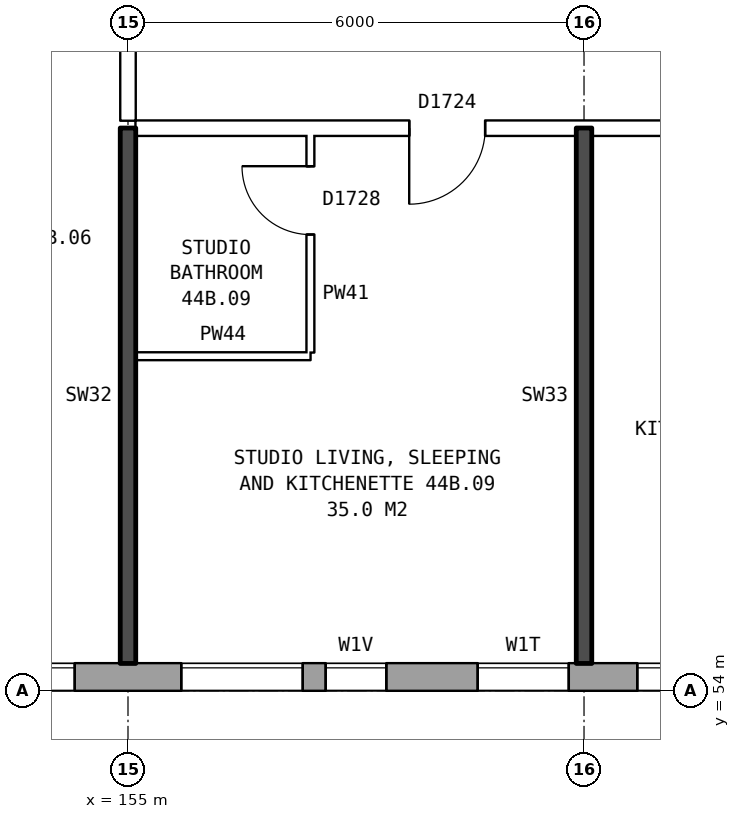
"""IFC4 building model, lengths in metres.
Left out: names, types, materials, properties, quantities, classifications, styles, units other than length and angle.
Written with IfcOpenShell. Run it as: python <this file> out.ifc"""

import sys

from ifc_helpers import new_model, si_unit, direction, frame, frame_2d, origin, place, context, subcontext, project, spatial, rectangle, extrude, element, fill, save


model = new_model("IFC4")
c1 = context("Model", 3, precision=1e-05, world=origin(), true_north=direction((0.0, 1.0)))
c2 = subcontext(c1, "Body", "Model", "MODEL_VIEW")
j1 = project(units=[si_unit("LENGTHUNIT", "METRE"), si_unit("PLANEANGLEUNIT", "RADIAN")], contexts=[c1])
p1 = place(None, origin())
s1 = spatial("IfcSite", under=j1, at=p1, CompositionType="ELEMENT")
p2 = place(p1, origin())
s2 = spatial("IfcBuilding", under=s1, at=p2, CompositionType="ELEMENT")
p3 = place(p2, frame((0.0, 0.0, 157.8)))
s3 = spatial("IfcBuildingStorey", under=s2, at=p3, CompositionType="ELEMENT", Elevation=157.8)
p4 = place(p3, frame((134.075, 54.18, 0.0), z_axis=(0.0, 0.0, 1.0), x_axis=(1.0, 0.0, 0.0)))
e1 = element("IfcWall", 1, at=p4, inside=s3, PredefinedType="STANDARD", context=c2, shape_type="SweptSolid", body=[
    extrude(rectangle(XDim=34.351, YDim=0.36, at=frame_2d((17.175, 0.0))), origin(), (0.0, 0.0, 1.0), 2.85),
])
p5 = place(p4, frame((0.625, 0.0, 0.8)))
e2 = element("IfcOpeningElement", 2, at=p5, cuts=e1, PredefinedType="OPENING", context=c2, shape_type="SweptSolid", body=[
    extrude(rectangle(XDim=1.6, YDim=1.8, at=frame_2d((0.8, 0.9))), frame((0.0, 0.19, 0.0), z_axis=(0.0, -1.0, 0.0), x_axis=(1.0, 0.0, 0.0)), (0.0, 0.0, 1.0), 0.38),
])
p6 = place(p4, frame((3.625, 0.0, 0.8)))
e3 = element("IfcOpeningElement", 3, at=p6, cuts=e1, PredefinedType="OPENING", context=c2, shape_type="SweptSolid", body=[
    extrude(rectangle(XDim=1.6, YDim=1.8, at=frame_2d((0.8, 0.9))), frame((0.0, 0.19, 0.0), z_axis=(0.0, -1.0, 0.0), x_axis=(1.0, 0.0, 0.0)), (0.0, 0.0, 1.0), 0.38),
])
p7 = place(p4, frame((5.525, 0.0, 0.8)))
e4 = element("IfcOpeningElement", 4, at=p7, cuts=e1, PredefinedType="OPENING", context=c2, shape_type="SweptSolid", body=[
    extrude(rectangle(XDim=1.4, YDim=1.8, at=frame_2d((0.7, 0.9))), frame((0.0, 0.19, 0.0), z_axis=(0.0, -1.0, 0.0), x_axis=(1.0, 0.0, 0.0)), (0.0, 0.0, 1.0), 0.38),
])
p8 = place(p4, frame((9.575, 0.0, 0.45)))
e5 = element("IfcOpeningElement", 5, at=p8, cuts=e1, PredefinedType="OPENING", context=c2, shape_type="SweptSolid", body=[
    extrude(rectangle(XDim=0.6, YDim=0.9, at=frame_2d((0.3, 0.45))), frame((0.0, 0.19, 0.0), z_axis=(0.0, -1.0, 0.0), x_axis=(1.0, 0.0, 0.0)), (0.0, 0.0, 1.0), 0.38),
])
p9 = place(p4, frame((12.625, 0.0, 0.8)))
e6 = element("IfcOpeningElement", 6, at=p9, cuts=e1, PredefinedType="OPENING", context=c2, shape_type="SweptSolid", body=[
    extrude(rectangle(XDim=1.6, YDim=1.8, at=frame_2d((0.8, 0.9))), frame((0.0, 0.19, 0.0), z_axis=(0.0, -1.0, 0.0), x_axis=(1.0, 0.0, 0.0)), (0.0, 0.0, 1.0), 0.38),
])
p10 = place(p4, frame((15.625, 0.0, 0.8)))
e7 = element("IfcOpeningElement", 7, at=p10, cuts=e1, PredefinedType="OPENING", context=c2, shape_type="SweptSolid", body=[
    extrude(rectangle(XDim=1.6, YDim=1.8, at=frame_2d((0.8, 0.9))), frame((0.0, 0.19, 0.0), z_axis=(0.0, -1.0, 0.0), x_axis=(1.0, 0.0, 0.0)), (0.0, 0.0, 1.0), 0.38),
])
p11 = place(p4, frame((18.625, 0.0, 0.8)))
e8 = element("IfcOpeningElement", 8, at=p11, cuts=e1, PredefinedType="OPENING", context=c2, shape_type="SweptSolid", body=[
    extrude(rectangle(XDim=1.6, YDim=1.8, at=frame_2d((0.8, 0.9))), frame((0.0, 0.19, 0.0), z_axis=(0.0, -1.0, 0.0), x_axis=(1.0, 0.0, 0.0)), (0.0, 0.0, 1.0), 0.38),
])
p12 = place(p4, frame((21.625, 0.0, 0.8)))
e9 = element("IfcOpeningElement", 9, at=p12, cuts=e1, PredefinedType="OPENING", context=c2, shape_type="SweptSolid", body=[
    extrude(rectangle(XDim=1.6, YDim=1.8, at=frame_2d((0.8, 0.9))), frame((0.0, 0.19, 0.0), z_axis=(0.0, -1.0, 0.0), x_axis=(1.0, 0.0, 0.0)), (0.0, 0.0, 1.0), 0.38),
])
p13 = place(p4, frame((23.525, 0.0, 0.8)))
e10 = element("IfcOpeningElement", 10, at=p13, cuts=e1, PredefinedType="OPENING", context=c2, shape_type="SweptSolid", body=[
    extrude(rectangle(XDim=0.8, YDim=0.9, at=frame_2d((0.4, 0.45))), frame((0.0, 0.19, 0.0), z_axis=(0.0, -1.0, 0.0), x_axis=(1.0, 0.0, 0.0)), (0.0, 0.0, 1.0), 0.38),
])
p14 = place(p4, frame((27.625, 0.0, 0.8)))
e11 = element("IfcOpeningElement", 11, at=p14, cuts=e1, PredefinedType="OPENING", context=c2, shape_type="SweptSolid", body=[
    extrude(rectangle(XDim=1.6, YDim=1.8, at=frame_2d((0.8, 0.9))), frame((0.0, 0.19, 0.0), z_axis=(0.0, -1.0, 0.0), x_axis=(1.0, 0.0, 0.0)), (0.0, 0.0, 1.0), 0.38),
])
p15 = place(p4, frame((30.625, 0.0, 0.8)))
e12 = element("IfcOpeningElement", 12, at=p15, cuts=e1, PredefinedType="OPENING", context=c2, shape_type="SweptSolid", body=[
    extrude(rectangle(XDim=1.6, YDim=1.8, at=frame_2d((0.8, 0.9))), frame((0.0, 0.19, 0.0), z_axis=(0.0, -1.0, 0.0), x_axis=(1.0, 0.0, 0.0)), (0.0, 0.0, 1.0), 0.38),
])
p16 = place(p4, frame((7.225, 0.0, 1.0)))
e13 = element("IfcOpeningElement", 13, at=p16, cuts=e1, PredefinedType="OPENING", context=c2, shape_type="SweptSolid", body=[
    extrude(rectangle(XDim=0.8, YDim=1.5, at=frame_2d((0.4, 0.75))), frame((0.0, 0.19, 0.0), z_axis=(0.0, -1.0, 0.0), x_axis=(1.0, 0.0, 0.0)), (0.0, 0.0, 1.0), 0.38),
])
p17 = place(p4, frame((10.575, 0.0, 0.45)))
e14 = element("IfcOpeningElement", 14, at=p17, cuts=e1, PredefinedType="OPENING", context=c2, shape_type="SweptSolid", body=[
    extrude(rectangle(XDim=1.2, YDim=1.8, at=frame_2d((0.6, 0.9))), frame((0.0, 0.19, 0.0), z_axis=(0.0, -1.0, 0.0), x_axis=(1.0, 0.0, 0.0)), (0.0, 0.0, 1.0), 0.38),
])
p18 = place(p4, frame((25.525, 0.0, 1.7)))
e15 = element("IfcOpeningElement", 15, at=p18, cuts=e1, PredefinedType="OPENING", context=c2, shape_type="SweptSolid", body=[
    extrude(rectangle(XDim=1.2, YDim=0.9, at=frame_2d((0.6, 0.45))), frame((0.0, 0.19, 0.0), z_axis=(0.0, -1.0, 0.0), x_axis=(1.0, 0.0, 0.0)), (0.0, 0.0, 1.0), 0.38),
])
p19 = place(p3, frame((155.1, 58.4, 0.0), z_axis=(0.0, 0.0, 1.0), x_axis=(1.0, 0.0, 0.0)))
e16 = element("IfcWall", 16, at=p19, inside=s3, PredefinedType="PARTITIONING", context=c2, shape_type="SweptSolid", body=[
    extrude(rectangle(XDim=2.3, YDim=0.1, at=frame_2d((1.15, 0.0))), origin(), (0.0, 0.0, 1.0), 2.85),
])
p20 = place(p3, frame((155.1, 61.4, 0.0), z_axis=(0.0, 0.0, 1.0), x_axis=(1.0, 0.0, 0.0)))
e17 = element("IfcWall", 17, at=p20, inside=s3, PredefinedType="PARTITIONING", context=c2, shape_type="SweptSolid", body=[
    extrude(rectangle(XDim=16.04, YDim=0.2, at=frame_2d((8.02, 0.0))), origin(), (0.0, 0.0, 1.0), 2.85),
])
p21 = place(p20, frame((3.6, 0.0, 0.0)))
e18 = element("IfcOpeningElement", 18, at=p21, cuts=e17, PredefinedType="OPENING", context=c2, shape_type="SweptSolid", body=[
    extrude(rectangle(XDim=1.0, YDim=2.1, at=frame_2d((0.5, 1.05))), frame((0.0, 0.11, 0.0), z_axis=(0.0, -1.0, 0.0), x_axis=(1.0, 0.0, 0.0)), (0.0, 0.0, 1.0), 0.22),
])
p22 = place(p20, frame((8.4, 0.0, 0.0)))
e19 = element("IfcOpeningElement", 19, at=p22, cuts=e17, PredefinedType="OPENING", context=c2, shape_type="SweptSolid", body=[
    extrude(rectangle(XDim=1.0, YDim=2.1, at=frame_2d((0.5, 1.05))), frame((0.0, 0.11, 0.0), z_axis=(0.0, -1.0, 0.0), x_axis=(1.0, 0.0, 0.0)), (0.0, 0.0, 1.0), 0.22),
])
p23 = place(p3, frame((155.0, 54.36, 0.0), z_axis=(0.0, 0.0, 1.0), x_axis=(0.0, 1.0, 0.0)))
e20 = element("IfcWall", 20, at=p23, inside=s3, PredefinedType="SOLIDWALL", context=c2, shape_type="SweptSolid", body=[
    extrude(rectangle(XDim=7.04, YDim=0.2, at=frame_2d((3.52, 0.0))), origin(), (0.0, 0.0, 1.0), 2.85),
])
p24 = place(p3, frame((155.0, 61.5, 0.0), z_axis=(0.0, 0.0, 1.0), x_axis=(0.0, 1.0, 0.0)))
e21 = element("IfcWall", 21, at=p24, inside=s3, PredefinedType="PARTITIONING", context=c2, shape_type="SweptSolid", body=[
    extrude(rectangle(XDim=2.2, YDim=0.2, at=frame_2d((1.1, 0.0))), origin(), (0.0, 0.0, 1.0), 2.85),
])
p25 = place(p3, frame((157.4, 58.45, 0.0), z_axis=(0.0, 0.0, 1.0), x_axis=(0.0, 1.0, 0.0)))
e22 = element("IfcWall", 22, at=p25, inside=s3, PredefinedType="PARTITIONING", context=c2, shape_type="SweptSolid", body=[
    extrude(rectangle(XDim=2.85, YDim=0.1, at=frame_2d((1.425, 0.0))), origin(), (0.0, 0.0, 1.0), 2.85),
])
p26 = place(p25, frame((1.55, 0.0, 0.0)))
e23 = element("IfcOpeningElement", 23, at=p26, cuts=e22, PredefinedType="OPENING", context=c2, shape_type="SweptSolid", body=[
    extrude(rectangle(XDim=0.9, YDim=2.1, at=frame_2d((0.45, 1.05))), frame((0.0, 0.06, 0.0), z_axis=(0.0, -1.0, 0.0), x_axis=(1.0, 0.0, 0.0)), (0.0, 0.0, 1.0), 0.12),
])
p27 = place(p3, frame((161.0, 54.36, 0.0), z_axis=(0.0, 0.0, 1.0), x_axis=(0.0, 1.0, 0.0)))
e24 = element("IfcWall", 24, at=p27, inside=s3, PredefinedType="SOLIDWALL", context=c2, shape_type="SweptSolid", body=[
    extrude(rectangle(XDim=7.04, YDim=0.2, at=frame_2d((3.52, 0.0))), origin(), (0.0, 0.0, 1.0), 2.85),
])
p28 = place(p11, origin())
e25 = element("IfcWindow", 25, at=p28, inside=s3, PartitioningType="SINGLE_PANEL", PredefinedType="WINDOW", context=c2, shape_type="SweptSolid", body=[
    extrude(rectangle(XDim=1.6, YDim=1.8, at=frame_2d((0.8, 0.9))), frame((0.0, 0.15, 0.0), z_axis=(0.0, -1.0, 0.0), x_axis=(1.0, 0.0, 0.0)), (0.0, 0.0, 1.0), 0.06),
])
fill(e8, e25)
p29 = place(p12, origin())
e26 = element("IfcWindow", 26, at=p29, inside=s3, PartitioningType="SINGLE_PANEL", PredefinedType="WINDOW", context=c2, shape_type="SweptSolid", body=[
    extrude(rectangle(XDim=1.6, YDim=1.8, at=frame_2d((0.8, 0.9))), frame((0.0, 0.15, 0.0), z_axis=(0.0, -1.0, 0.0), x_axis=(1.0, 0.0, 0.0)), (0.0, 0.0, 1.0), 0.06),
])
fill(e9, e26)
p30 = place(p13, origin())
e27 = element("IfcWindow", 27, at=p30, inside=s3, PartitioningType="SINGLE_PANEL", PredefinedType="WINDOW", context=c2, shape_type="SweptSolid", body=[
    extrude(rectangle(XDim=0.8, YDim=0.9, at=frame_2d((0.4, 0.45))), frame((0.0, 0.15, 0.0), z_axis=(0.0, -1.0, 0.0), x_axis=(1.0, 0.0, 0.0)), (0.0, 0.0, 1.0), 0.06),
])
fill(e10, e27)
p31 = place(p14, origin())
e28 = element("IfcWindow", 28, at=p31, inside=s3, PartitioningType="SINGLE_PANEL", PredefinedType="WINDOW", context=c2, shape_type="SweptSolid", body=[
    extrude(rectangle(XDim=1.6, YDim=1.8, at=frame_2d((0.8, 0.9))), frame((0.0, 0.15, 0.0), z_axis=(0.0, -1.0, 0.0), x_axis=(1.0, 0.0, 0.0)), (0.0, 0.0, 1.0), 0.06),
])
fill(e11, e28)
p32 = place(p21, frame((1.0, 0.0, 0.0), z_axis=(0.0, 0.0, 1.0), x_axis=(-1.0, 0.0, 0.0)))
e29 = element("IfcDoor", 29, at=p32, inside=s3, OperationType="SINGLE_SWING_RIGHT", PredefinedType="DOOR", context=c2, shape_type="SweptSolid", body=[
    extrude(rectangle(XDim=1.0, YDim=2.1, at=frame_2d((0.5, 1.05))), frame((0.0, 0.025, 0.0), z_axis=(0.0, -1.0, 0.0), x_axis=(1.0, 0.0, 0.0)), (0.0, 0.0, 1.0), 0.05),
])
fill(e18, e29)
p33 = place(p26, origin())
e30 = element("IfcDoor", 30, at=p33, inside=s3, OperationType="SINGLE_SWING_RIGHT", PredefinedType="DOOR", context=c2, shape_type="SweptSolid", body=[
    extrude(rectangle(XDim=0.9, YDim=2.1, at=frame_2d((0.45, 1.05))), frame((0.0, 0.025, 0.0), z_axis=(0.0, -1.0, 0.0), x_axis=(1.0, 0.0, 0.0)), (0.0, 0.0, 1.0), 0.05),
])
fill(e23, e30)
p34 = place(p18, origin())
e31 = element("IfcWindow", 31, at=p34, inside=s3, PartitioningType="SINGLE_PANEL", PredefinedType="WINDOW", context=c2, shape_type="SweptSolid", body=[
    extrude(rectangle(XDim=1.2, YDim=0.9, at=frame_2d((0.6, 0.45))), frame((0.0, 0.15, 0.0), z_axis=(0.0, -1.0, 0.0), x_axis=(1.0, 0.0, 0.0)), (0.0, 0.0, 1.0), 0.06),
])
fill(e15, e31)
save(model, sys.argv[1])
